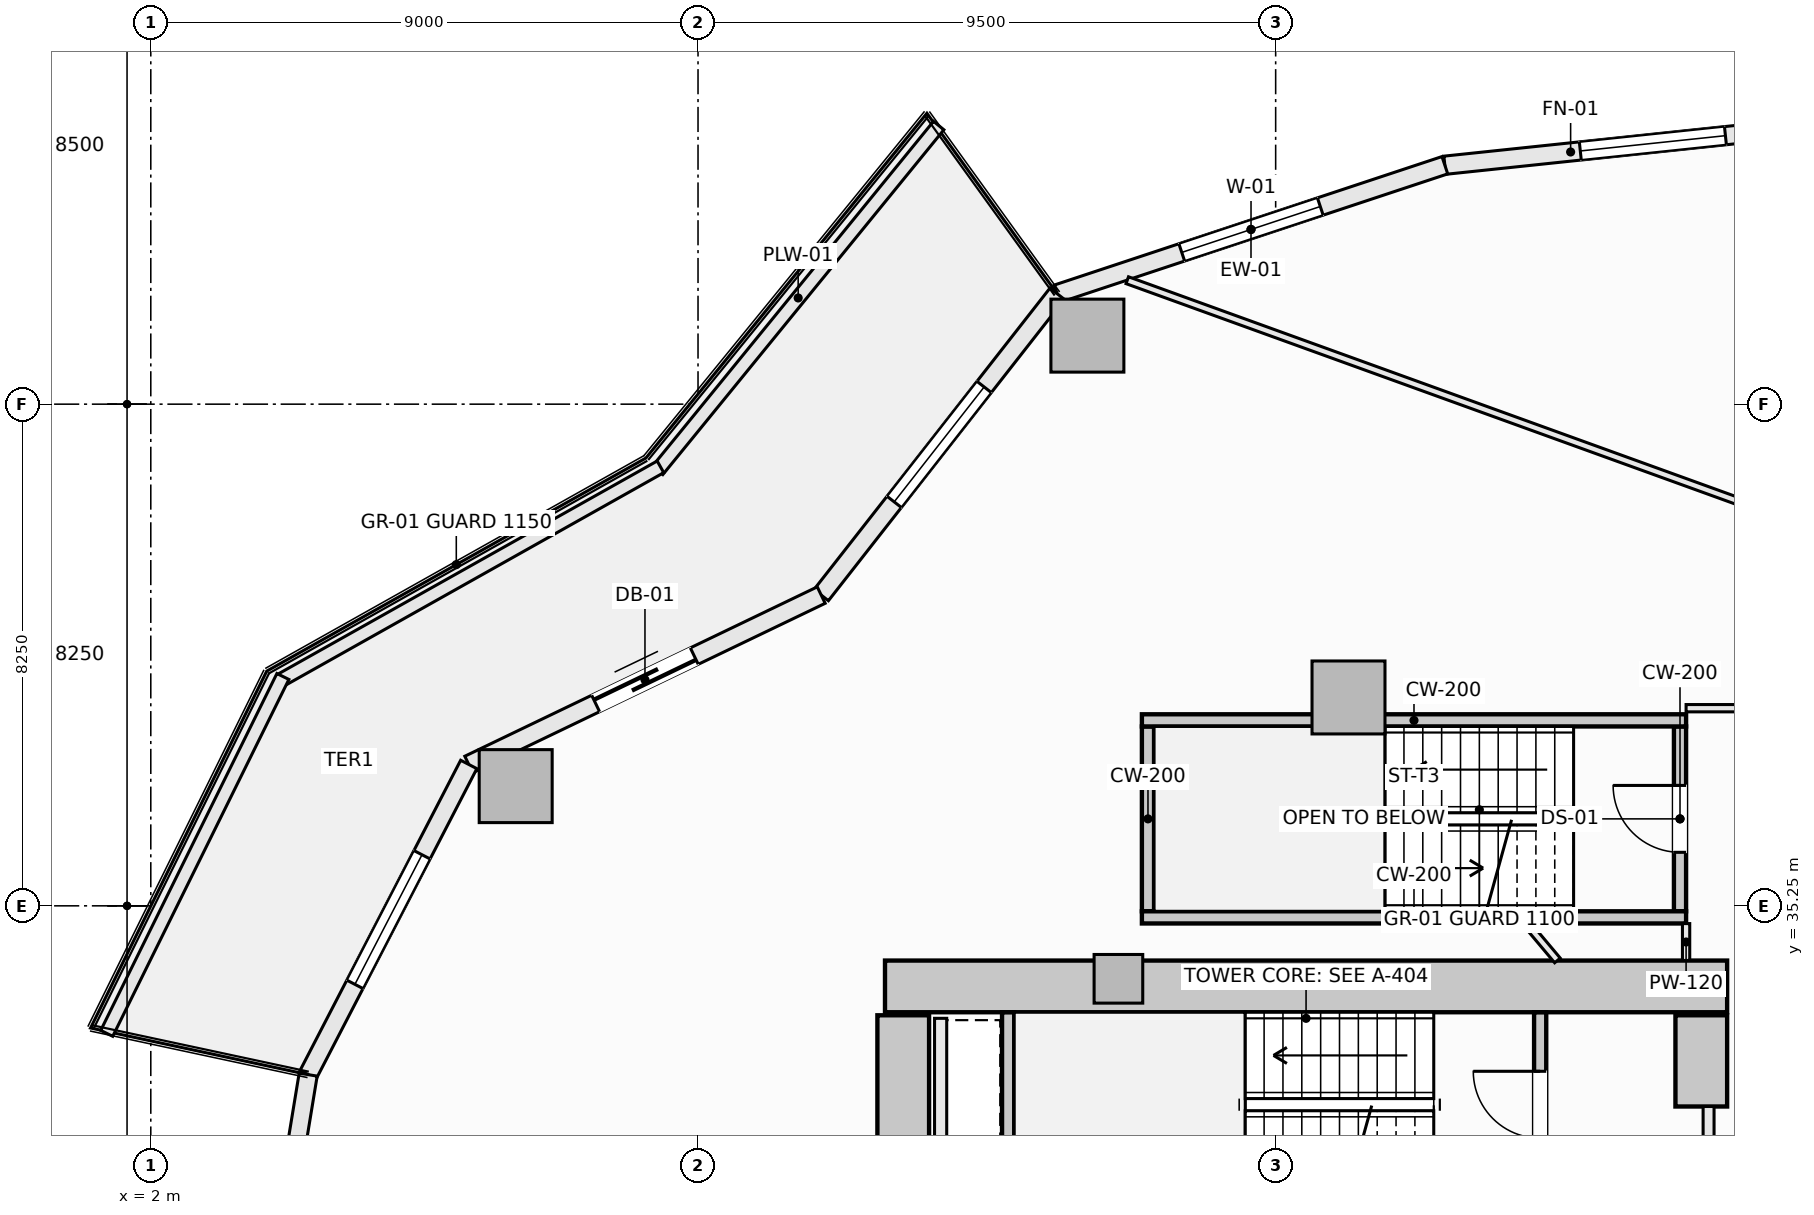
"""IFC4 building model, lengths in metres.
Left out: names, types, materials, properties, quantities, classifications, styles, units other than length and angle.
Written with IfcOpenShell. Run it as: python <this file> out.ifc"""

import sys

from ifc_helpers import new_model, si_unit, direction, frame, frame_2d, origin, origin_2d, place, context, subcontext, project, spatial, rectangle, extrude, element, fill, save


model = new_model("IFC4")
c1 = context("Model", 3, precision=1e-05, world=origin(), true_north=direction((0.0, 1.0)))
c2 = subcontext(c1, "Body", "Model", "MODEL_VIEW")
j1 = project(units=[si_unit("LENGTHUNIT", "METRE"), si_unit("PLANEANGLEUNIT", "RADIAN")], contexts=[c1])
p1 = place(None, origin())
s1 = spatial("IfcSite", under=j1, at=p1, CompositionType="ELEMENT")
p2 = place(p1, origin())
s2 = spatial("IfcBuilding", under=s1, at=p2, CompositionType="ELEMENT")
p3 = place(p2, frame((0.0, 0.0, 76.55)))
s3 = spatial("IfcBuildingStorey", under=s2, at=p3, CompositionType="ELEMENT", Elevation=76.55)
p4 = place(p3, frame((14.075, 33.925, -0.28), z_axis=(0.0, 0.0, 1.0), x_axis=(1.0, 0.0, 0.0)))
e1 = element("IfcWall", 1, at=p4, inside=s3, PredefinedType="SHEAR", context=c2, shape_type="SweptSolid", body=[
    extrude(rectangle(XDim=13.85, YDim=0.85, at=frame_2d((6.925, 0.0))), origin(), (0.0, 0.0, 1.0), 3.85),
])
p5 = place(p3, frame((14.375, 20.55, -0.28), z_axis=(0.0, 0.0, 1.0), x_axis=(0.0, 1.0, 0.0)))
e2 = element("IfcWall", 2, at=p5, inside=s3, PredefinedType="SHEAR", context=c2, shape_type="SweptSolid", body=[
    extrude(rectangle(XDim=12.9, YDim=0.85, at=frame_2d((6.45, 0.0))), origin(), (0.0, 0.0, 1.0), 3.85),
])
p6 = place(p3, frame((27.5, 31.95, -0.28), z_axis=(0.0, 0.0, 1.0), x_axis=(0.0, 1.0, 0.0)))
e3 = element("IfcWall", 3, at=p6, inside=s3, PredefinedType="SHEAR", context=c2, shape_type="SweptSolid", body=[
    extrude(rectangle(XDim=1.5, YDim=0.85, at=frame_2d((0.75, 0.0))), origin(), (0.0, 0.0, 1.0), 3.85),
])
for number, where, z_axis, x_axis in (
    (4, (17.404, 44.627, -0.28), (0.0, 0.0, 1.0), (1.0, 0.0, 0.0)),
    (5, (8.001, 37.219, -0.28), (0.0, 0.0, 1.0), (1.0, 0.0, 0.0)),
    (6, (21.698, 38.677, -0.28), (0.0, 0.0, 1.0), (1.0, 0.0, 0.0)),
):
    element("IfcColumn", number, at=place(p3, frame(where, z_axis=z_axis, x_axis=x_axis)), inside=s3, PredefinedType="COLUMN", context=c2, shape_type="SweptSolid", body=[
        extrude(rectangle(XDim=1.2, YDim=1.2, at=origin_2d()), origin(), (0.0, 0.0, 1.0), 3.85),
    ])
p7 = place(p3, frame((17.914, 34.05, -0.28), z_axis=(0.0, 0.0, 1.0), x_axis=(1.0, 0.0, 0.0)))
e7 = element("IfcColumn", 7, at=p7, inside=s3, PredefinedType="PILASTER", context=c2, shape_type="SweptSolid", body=[
    extrude(rectangle(XDim=0.8, YDim=0.8, at=origin_2d()), origin(), (0.0, 0.0, 1.0), 3.85),
])
p8 = place(p3, frame((23.282, 47.429, 0.0), z_axis=(0.0, 0.0, 1.0), x_axis=(0.994498840295, 0.104747585419, 0.0)))
e8 = element("IfcWall", 8, at=p8, inside=s3, PredefinedType="SOLIDWALL", context=c2, shape_type="SweptSolid", body=[
    extrude(rectangle(XDim=6.88, YDim=0.3, at=frame_2d((3.44, 0.0))), origin(), (0.0, 0.0, 1.0), 3.093),
])
p9 = place(p8, frame((2.24, 0.0, 0.85)))
e9 = element("IfcOpeningElement", 9, at=p9, cuts=e8, PredefinedType="OPENING", context=c2, shape_type="SweptSolid", body=[
    extrude(rectangle(XDim=2.4, YDim=1.9, at=frame_2d((1.2, 0.95))), frame((0.0, 0.16, 0.0), z_axis=(0.0, -1.0, 0.0), x_axis=(1.0, 0.0, 0.0)), (0.0, 0.0, 1.0), 0.32),
])
p10 = place(p3, frame((16.906, 45.316, 0.0), z_axis=(0.0, 0.0, 1.0), x_axis=(0.949245153629, 0.314537181127, 0.0)))
e10 = element("IfcWall", 10, at=p10, inside=s3, PredefinedType="SOLIDWALL", context=c2, shape_type="SweptSolid", body=[
    extrude(rectangle(XDim=6.717, YDim=0.3, at=frame_2d((3.358, 0.0))), origin(), (0.0, 0.0, 1.0), 3.093),
])
p11 = place(p10, frame((2.159, 0.0, 0.85)))
e11 = element("IfcOpeningElement", 11, at=p11, cuts=e10, PredefinedType="OPENING", context=c2, shape_type="SweptSolid", body=[
    extrude(rectangle(XDim=2.4, YDim=1.9, at=frame_2d((1.2, 0.95))), frame((0.0, 0.16, 0.0), z_axis=(0.0, -1.0, 0.0), x_axis=(1.0, 0.0, 0.0)), (0.0, 0.0, 1.0), 0.32),
])
p12 = place(p3, frame((13.026, 40.36, 0.0), z_axis=(0.0, 0.0, 1.0), x_axis=(0.616434798832, 0.78740595552, 0.0)))
e12 = element("IfcWall", 12, at=p12, inside=s3, PredefinedType="SOLIDWALL", context=c2, shape_type="SweptSolid", body=[
    extrude(rectangle(XDim=6.294, YDim=0.3, at=frame_2d((3.147, 0.0))), origin(), (0.0, 0.0, 1.0), 3.093),
])
p13 = place(p12, frame((1.947, 0.0, 0.85)))
e13 = element("IfcOpeningElement", 13, at=p13, cuts=e12, PredefinedType="OPENING", context=c2, shape_type="SweptSolid", body=[
    extrude(rectangle(XDim=2.4, YDim=1.9, at=frame_2d((1.2, 0.95))), frame((0.0, 0.16, 0.0), z_axis=(0.0, -1.0, 0.0), x_axis=(1.0, 0.0, 0.0)), (0.0, 0.0, 1.0), 0.32),
])
p14 = place(p3, frame((7.229, 37.575, 0.0), z_axis=(0.0, 0.0, 1.0), x_axis=(0.901354747727, 0.433081538224, 0.0)))
e14 = element("IfcWall", 14, at=p14, inside=s3, PredefinedType="SOLIDWALL", context=c2, shape_type="SweptSolid", body=[
    extrude(rectangle(XDim=6.431, YDim=0.3, at=frame_2d((3.215, 0.0))), origin(), (0.0, 0.0, 1.0), 3.093),
])
p15 = place(p14, frame((2.315, 0.0, 0.0)))
e15 = element("IfcOpeningElement", 15, at=p15, cuts=e14, PredefinedType="OPENING", context=c2, shape_type="SweptSolid", body=[
    extrude(rectangle(XDim=1.8, YDim=2.25, at=frame_2d((0.9, 1.125))), frame((0.0, 0.16, 0.0), z_axis=(0.0, -1.0, 0.0), x_axis=(1.0, 0.0, 0.0)), (0.0, 0.0, 1.0), 0.32),
])
p16 = place(p3, frame((4.588, 32.474, 0.0), z_axis=(0.0, 0.0, 1.0), x_axis=(0.459800981414, 0.888021991558, 0.0)))
e16 = element("IfcWall", 16, at=p16, inside=s3, PredefinedType="SOLIDWALL", context=c2, shape_type="SweptSolid", body=[
    extrude(rectangle(XDim=5.744, YDim=0.3, at=frame_2d((2.872, 0.0))), origin(), (0.0, 0.0, 1.0), 3.093),
])
p17 = place(p16, frame((1.672, 0.0, 0.85)))
e17 = element("IfcOpeningElement", 17, at=p17, cuts=e16, PredefinedType="OPENING", context=c2, shape_type="SweptSolid", body=[
    extrude(rectangle(XDim=2.4, YDim=1.9, at=frame_2d((1.2, 0.95))), frame((0.0, 0.16, 0.0), z_axis=(0.0, -1.0, 0.0), x_axis=(1.0, 0.0, 0.0)), (0.0, 0.0, 1.0), 0.32),
])
p18 = place(p3, frame((3.688, 27.0, 0.0), z_axis=(0.0, 0.0, 1.0), x_axis=(0.162386212206, 0.986727276447, 0.0)))
e18 = element("IfcWall", 18, at=p18, inside=s3, PredefinedType="SOLIDWALL", context=c2, shape_type="SweptSolid", body=[
    extrude(rectangle(XDim=5.548, YDim=0.3, at=frame_2d((2.774, 0.0))), origin(), (0.0, 0.0, 1.0), 3.093),
])
p19 = place(p18, frame((1.574, 0.0, 0.85)))
e19 = element("IfcOpeningElement", 19, at=p19, cuts=e18, PredefinedType="OPENING", context=c2, shape_type="SweptSolid", body=[
    extrude(rectangle(XDim=2.4, YDim=1.9, at=frame_2d((1.2, 0.95))), frame((0.0, 0.16, 0.0), z_axis=(0.0, -1.0, 0.0), x_axis=(1.0, 0.0, 0.0)), (0.0, 0.0, 1.0), 0.32),
])
p20 = place(p3, frame((10.336, 42.411, 0.0), z_axis=(0.0, 0.0, 1.0), x_axis=(0.631819273026, 0.775115737315, 0.0)))
e20 = element("IfcWall", 20, at=p20, inside=s3, PredefinedType="PARAPET", context=c2, shape_type="SweptSolid", body=[
    extrude(rectangle(XDim=7.316, YDim=0.22, at=frame_2d((3.658, 0.0))), origin(), (0.0, 0.0, 1.0), 0.52),
])
p21 = place(p3, frame((4.147, 38.966, 0.0), z_axis=(0.0, 0.0, 1.0), x_axis=(0.871775109335, 0.489906275468, 0.0)))
e21 = element("IfcWall", 21, at=p21, inside=s3, PredefinedType="PARAPET", context=c2, shape_type="SweptSolid", body=[
    extrude(rectangle(XDim=7.152, YDim=0.22, at=frame_2d((3.576, 0.0))), origin(), (0.0, 0.0, 1.0), 0.52),
])
p22 = place(p3, frame((1.275, 33.153, 0.0), z_axis=(0.0, 0.0, 1.0), x_axis=(0.442686636348, 0.89667638644, 0.0)))
e22 = element("IfcWall", 22, at=p22, inside=s3, PredefinedType="PARAPET", context=c2, shape_type="SweptSolid", body=[
    extrude(rectangle(XDim=6.545, YDim=0.22, at=frame_2d((3.272, 0.0))), origin(), (0.0, 0.0, 1.0), 0.52),
])
p23 = place(p3, frame((24.85, 30.46, -0.28), z_axis=(0.0, 0.0, 1.0), x_axis=(0.0, 1.0, 0.0)))
e23 = element("IfcWall", 23, at=p23, inside=s3, PredefinedType="SHEAR", context=c2, shape_type="SweptSolid", body=[
    extrude(rectangle(XDim=3.038, YDim=0.2, at=frame_2d((1.519, 0.0))), origin(), (0.0, 0.0, 1.0), 3.85),
])
p24 = place(p23, frame((0.969, 0.0, 0.28)))
e24 = element("IfcOpeningElement", 24, at=p24, cuts=e23, PredefinedType="OPENING", context=c2, shape_type="SweptSolid", body=[
    extrude(rectangle(XDim=1.1, YDim=2.15, at=frame_2d((0.55, 1.075))), frame((0.0, 0.11, 0.0), z_axis=(0.0, -1.0, 0.0), x_axis=(1.0, 0.0, 0.0)), (0.0, 0.0, 1.0), 0.22),
])
p25 = place(p3, frame((16.1, 30.462, -0.28), z_axis=(0.0, 0.0, 1.0), x_axis=(0.0, 1.0, 0.0)))
e25 = element("IfcWall", 25, at=p25, inside=s3, PredefinedType="SHEAR", context=c2, shape_type="SweptSolid", body=[
    extrude(rectangle(XDim=3.036, YDim=0.2, at=frame_2d((1.518, 0.0))), origin(), (0.0, 0.0, 1.0), 3.85),
])
p26 = place(p3, frame((27.15, 35.16, -0.28), z_axis=(0.0, 0.0, 1.0), x_axis=(0.0, 1.0, 0.0)))
e26 = element("IfcWall", 26, at=p26, inside=s3, PredefinedType="SHEAR", context=c2, shape_type="SweptSolid", body=[
    extrude(rectangle(XDim=3.04, YDim=0.2, at=frame_2d((1.52, 0.0))), origin(), (0.0, 0.0, 1.0), 3.85),
])
p27 = place(p26, frame((0.97, 0.0, 0.28)))
e27 = element("IfcOpeningElement", 27, at=p27, cuts=e26, PredefinedType="OPENING", context=c2, shape_type="SweptSolid", body=[
    extrude(rectangle(XDim=1.1, YDim=2.15, at=frame_2d((0.55, 1.075))), frame((0.0, 0.11, 0.0), z_axis=(0.0, -1.0, 0.0), x_axis=(1.0, 0.0, 0.0)), (0.0, 0.0, 1.0), 0.22),
])
p28 = place(p3, frame((18.4, 35.16, -0.28), z_axis=(0.0, 0.0, 1.0), x_axis=(0.0, 1.0, 0.0)))
e28 = element("IfcWall", 28, at=p28, inside=s3, PredefinedType="SHEAR", context=c2, shape_type="SweptSolid", body=[
    extrude(rectangle(XDim=3.04, YDim=0.2, at=frame_2d((1.52, 0.0))), origin(), (0.0, 0.0, 1.0), 3.85),
])
for number, where, z_axis, x_axis in (
    (29, (18.3, 38.3, -0.28), (0.0, 0.0, 1.0), (1.0, 0.0, 0.0)),
    (30, (18.3, 35.06, -0.28), (0.0, 0.0, 1.0), (1.0, 0.0, 0.0)),
):
    element("IfcWall", number, at=place(p3, frame(where, z_axis=z_axis, x_axis=x_axis)), inside=s3, PredefinedType="SHEAR", context=c2, shape_type="SweptSolid", body=[
        extrude(rectangle(XDim=8.95, YDim=0.2, at=frame_2d((4.475, 0.0))), origin(), (0.0, 0.0, 1.0), 3.85),
    ])
p29 = place(p3, frame((14.99, 30.55, 0.0), z_axis=(0.0, 0.0, 1.0), x_axis=(0.0, 1.0, 0.0)))
e31 = element("IfcWall", 31, at=p29, inside=s3, PredefinedType="SOLIDWALL", context=c2, shape_type="SweptSolid", body=[
    extrude(rectangle(XDim=2.85, YDim=0.2, at=frame_2d((1.425, 0.0))), origin(), (0.0, 0.0, 1.0), 3.57),
])
p30 = place(p3, frame((27.62, 22.05, 0.0), z_axis=(0.0, 0.0, 1.0), x_axis=(0.0, 1.0, 0.0)))
e32 = element("IfcWall", 32, at=p30, inside=s3, PredefinedType="SOLIDWALL", context=c2, shape_type="SweptSolid", body=[
    extrude(rectangle(XDim=9.9, YDim=0.18, at=frame_2d((4.95, 0.0))), origin(), (0.0, 0.0, 1.0), 2.662),
])
p31 = place(p30, frame((4.475, 0.0, 0.0)))
e33 = element("IfcOpeningElement", 33, at=p31, cuts=e32, PredefinedType="OPENING", context=c2, shape_type="SweptSolid", body=[
    extrude(rectangle(XDim=0.95, YDim=2.1, at=frame_2d((0.475, 1.05))), frame((0.0, 0.1, 0.0), z_axis=(0.0, -1.0, 0.0), x_axis=(1.0, 0.0, 0.0)), (0.0, 0.0, 1.0), 0.2),
])
p32 = place(p30, frame((6.89, 0.0, 0.0)))
e34 = element("IfcOpeningElement", 34, at=p32, cuts=e32, PredefinedType="OPENING", context=c2, shape_type="SweptSolid", body=[
    extrude(rectangle(XDim=1.5, YDim=2.2, at=frame_2d((0.75, 1.1))), frame((0.0, 0.1, 0.0), z_axis=(0.0, -1.0, 0.0), x_axis=(1.0, 0.0, 0.0)), (0.0, 0.0, 1.0), 0.2),
])
p33 = place(p30, frame((1.51, 0.0, 0.0)))
e35 = element("IfcOpeningElement", 35, at=p33, cuts=e32, PredefinedType="OPENING", context=c2, shape_type="SweptSolid", body=[
    extrude(rectangle(XDim=1.5, YDim=2.2, at=frame_2d((0.75, 1.1))), frame((0.0, 0.1, 0.0), z_axis=(0.0, -1.0, 0.0), x_axis=(1.0, 0.0, 0.0)), (0.0, 0.0, 1.0), 0.2),
])
p34 = place(p3, frame((27.25, 34.352, 0.0), z_axis=(0.0, 0.0, 1.0), x_axis=(0.0, 1.0, 0.0)))
e36 = element("IfcWall", 36, at=p34, inside=s3, PredefinedType="PARTITIONING", context=c2, shape_type="SweptSolid", body=[
    extrude(rectangle(XDim=0.606, YDim=0.12, at=frame_2d((0.303, 0.0))), origin(), (0.0, 0.0, 1.0), 3.57),
])
p35 = place(p3, frame((27.25, 38.5, 0.0), z_axis=(0.0, 0.0, 1.0), x_axis=(1.0, 0.0, 0.0)))
e37 = element("IfcWall", 37, at=p35, inside=s3, PredefinedType="PARTITIONING", context=c2, shape_type="SweptSolid", body=[
    extrude(rectangle(XDim=2.53, YDim=0.12, at=frame_2d((1.265, 0.0))), origin(), (0.0, 0.0, 1.0), 3.57),
])
p36 = place(p3, frame((18.06, 45.538, 0.0), z_axis=(0.0, 0.0, 1.0), x_axis=(0.940354559933, -0.340195975304, 0.0)))
e38 = element("IfcWall", 38, at=p36, inside=s3, PredefinedType="PARTITIONING", context=c2, shape_type="SweptSolid", body=[
    extrude(rectangle(XDim=28.53, YDim=0.12, at=frame_2d((14.265, 0.0))), origin(), (0.0, 0.0, 1.0), 3.093),
])
p37 = place(p3, frame((24.626, 34.958, 0.0), z_axis=(0.0, 0.0, 1.0), x_axis=(0.643032873298, -0.765838575588, 0.0)))
e39 = element("IfcWall", 39, at=p37, inside=s3, PredefinedType="PARTITIONING", context=c2, shape_type="SweptSolid", body=[
    extrude(rectangle(XDim=0.791, YDim=0.12, at=frame_2d((0.396, 0.0))), origin(), (0.0, 0.0, 1.0), 3.57),
])
p38 = place(p9, origin())
e40 = element("IfcWindow", 40, at=p38, inside=s3, PartitioningType="SINGLE_PANEL", PredefinedType="WINDOW", context=c2, shape_type="SweptSolid", body=[
    extrude(rectangle(XDim=2.4, YDim=1.9, at=frame_2d((1.2, 0.95))), frame((0.0, 0.03, 0.0), z_axis=(0.0, -1.0, 0.0), x_axis=(1.0, 0.0, 0.0)), (0.0, 0.0, 1.0), 0.06),
])
fill(e9, e40)
p39 = place(p11, origin())
e41 = element("IfcWindow", 41, at=p39, inside=s3, PartitioningType="SINGLE_PANEL", PredefinedType="WINDOW", context=c2, shape_type="SweptSolid", body=[
    extrude(rectangle(XDim=2.4, YDim=1.9, at=frame_2d((1.2, 0.95))), frame((0.0, 0.03, 0.0), z_axis=(0.0, -1.0, 0.0), x_axis=(1.0, 0.0, 0.0)), (0.0, 0.0, 1.0), 0.06),
])
fill(e11, e41)
p40 = place(p13, origin())
e42 = element("IfcWindow", 42, at=p40, inside=s3, PartitioningType="SINGLE_PANEL", PredefinedType="WINDOW", context=c2, shape_type="SweptSolid", body=[
    extrude(rectangle(XDim=2.4, YDim=1.9, at=frame_2d((1.2, 0.95))), frame((0.0, 0.03, 0.0), z_axis=(0.0, -1.0, 0.0), x_axis=(1.0, 0.0, 0.0)), (0.0, 0.0, 1.0), 0.06),
])
fill(e13, e42)
p41 = place(p15, origin())
e43 = element("IfcDoor", 43, at=p41, inside=s3, OperationType="SLIDING_TO_LEFT", PredefinedType="DOOR", context=c2, shape_type="SweptSolid", body=[
    extrude(rectangle(XDim=1.8, YDim=2.25, at=frame_2d((0.9, 1.125))), frame((0.0, 0.025, 0.0), z_axis=(0.0, -1.0, 0.0), x_axis=(1.0, 0.0, 0.0)), (0.0, 0.0, 1.0), 0.05),
])
fill(e15, e43)
p42 = place(p17, origin())
e44 = element("IfcWindow", 44, at=p42, inside=s3, PartitioningType="SINGLE_PANEL", PredefinedType="WINDOW", context=c2, shape_type="SweptSolid", body=[
    extrude(rectangle(XDim=2.4, YDim=1.9, at=frame_2d((1.2, 0.95))), frame((0.0, 0.03, 0.0), z_axis=(0.0, -1.0, 0.0), x_axis=(1.0, 0.0, 0.0)), (0.0, 0.0, 1.0), 0.06),
])
fill(e17, e44)
p43 = place(p24, origin())
e45 = element("IfcDoor", 45, at=p43, inside=s3, OperationType="SINGLE_SWING_RIGHT", PredefinedType="DOOR", context=c2, shape_type="SweptSolid", body=[
    extrude(rectangle(XDim=1.1, YDim=2.15, at=frame_2d((0.55, 1.075))), frame((0.0, 0.025, 0.0), z_axis=(0.0, -1.0, 0.0), x_axis=(1.0, 0.0, 0.0)), (0.0, 0.0, 1.0), 0.05),
])
fill(e24, e45)
p44 = place(p27, origin())
e46 = element("IfcDoor", 46, at=p44, inside=s3, OperationType="SINGLE_SWING_RIGHT", PredefinedType="DOOR", context=c2, shape_type="SweptSolid", body=[
    extrude(rectangle(XDim=1.1, YDim=2.15, at=frame_2d((0.55, 1.075))), frame((0.0, 0.025, 0.0), z_axis=(0.0, -1.0, 0.0), x_axis=(1.0, 0.0, 0.0)), (0.0, 0.0, 1.0), 0.05),
])
fill(e27, e46)
save(model, sys.argv[1])
